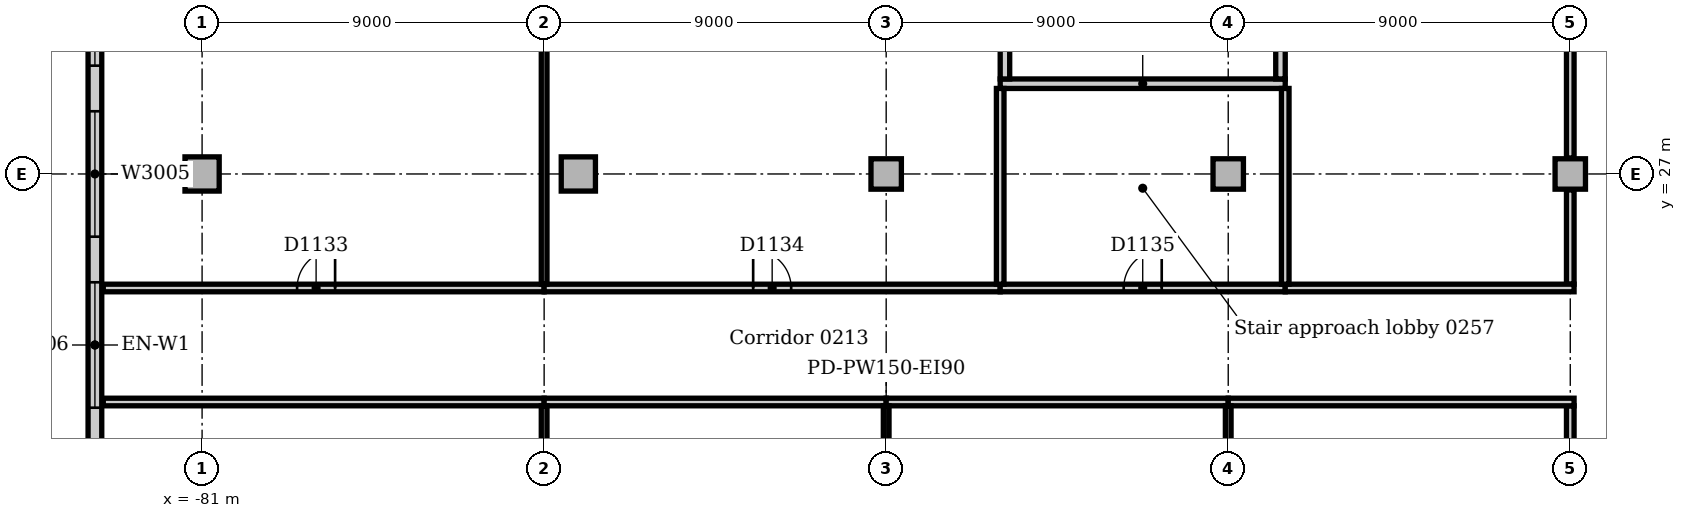
"""IFC4 building model, lengths in metres.
Left out: names, types, materials, properties, quantities, classifications, styles, units other than length and angle.
Written with IfcOpenShell. Run it as: python <this file> out.ifc"""

import sys

from ifc_helpers import new_model, si_unit, direction, frame, frame_2d, origin, origin_2d, place, context, subcontext, project, spatial, rectangle, extrude, element, fill, save


model = new_model("IFC4")
c1 = context("Model", 3, precision=1e-05, world=origin(), true_north=direction((0.0, 1.0)))
c2 = subcontext(c1, "Body", "Model", "MODEL_VIEW")
j1 = project(units=[si_unit("LENGTHUNIT", "METRE"), si_unit("PLANEANGLEUNIT", "RADIAN")], contexts=[c1])
p1 = place(None, origin())
s1 = spatial("IfcSite", under=j1, at=p1, CompositionType="ELEMENT")
p2 = place(p1, origin())
s2 = spatial("IfcBuilding", under=s1, at=p2, CompositionType="ELEMENT")
p3 = place(p2, frame((0.0, 0.0, 11.0)))
s3 = spatial("IfcBuildingStorey", under=s2, at=p3, CompositionType="ELEMENT", Elevation=11.0)
p4 = place(p3, frame((-60.0, 29.375, 0.0), z_axis=(0.0, 0.0, 1.0), x_axis=(1.0, 0.0, 0.0)))
e1 = element("IfcWall", 1, at=p4, inside=s3, PredefinedType="SOLIDWALL", context=c2, shape_type="SweptSolid", body=[
    extrude(rectangle(XDim=7.5, YDim=0.25, at=frame_2d((3.75, 0.0))), origin(), (0.0, 0.0, 1.0), 5.0),
])
for number, where, z_axis, x_axis in (
    (2, (-52.625, 29.5, 0.0), (0.0, 0.0, 1.0), (0.0, 1.0, 0.0)),
    (3, (-59.875, 33.5, 0.0), (0.0, 0.0, 1.0), (0.0, -1.0, 0.0)),
):
    element("IfcWall", number, at=place(p3, frame(where, z_axis=z_axis, x_axis=x_axis)), inside=s3, PredefinedType="SOLIDWALL", context=c2, shape_type="SweptSolid", body=[
        extrude(rectangle(XDim=4.0, YDim=0.25, at=frame_2d((2.0, 0.0))), origin(), (0.0, 0.0, 1.0), 5.0),
    ])
p5 = place(p3, frame((-71.1, 27.0, 0.0), z_axis=(0.0, 0.0, 1.0), x_axis=(1.0, 0.0, 0.0)))
e4 = element("IfcColumn", 4, at=p5, inside=s3, PredefinedType="COLUMN", context=c2, shape_type="SweptSolid", body=[
    extrude(rectangle(XDim=0.9, YDim=0.9, at=origin_2d()), origin(), (0.0, 0.0, 1.0), 4.7),
])
for number, where, z_axis, x_axis in (
    (5, (-63.0, 27.0, 0.0), (0.0, 0.0, 1.0), (1.0, 0.0, 0.0)),
    (6, (-54.0, 27.0, 0.0), (0.0, 0.0, 1.0), (1.0, 0.0, 0.0)),
    (7, (-45.0, 27.0, 0.0), (0.0, 0.0, 1.0), (1.0, 0.0, 0.0)),
):
    element("IfcColumn", number, at=place(p3, frame(where, z_axis=z_axis, x_axis=x_axis)), inside=s3, PredefinedType="COLUMN", context=c2, shape_type="SweptSolid", body=[
        extrude(rectangle(XDim=0.8, YDim=0.8, at=origin_2d()), origin(), (0.0, 0.0, 1.0), 4.7),
    ])
p6 = place(p3, frame((-81.0, 27.0, 0.0), z_axis=(0.0, 0.0, 1.0), x_axis=(1.0, 0.0, 0.0)))
e8 = element("IfcColumn", 8, at=p6, inside=s3, PredefinedType="COLUMN", context=c2, shape_type="SweptSolid", body=[
    extrude(rectangle(XDim=0.9, YDim=0.9, at=origin_2d()), origin(), (0.0, 0.0, 1.0), 4.7),
])
p7 = place(p3, frame((-83.82, 54.0, 0.0), z_axis=(0.0, 0.0, 1.0), x_axis=(0.0, -1.0, 0.0)))
e9 = element("IfcWall", 9, at=p7, inside=s3, PredefinedType="STANDARD", context=c2, shape_type="SweptSolid", body=[
    extrude(rectangle(XDim=63.0, YDim=0.36, at=frame_2d((31.5, 0.0))), origin(), (0.0, 0.0, 1.0), 4.7),
])
p8 = place(p7, frame((2.85, 0.0, 0.9)))
e10 = element("IfcOpeningElement", 10, at=p8, cuts=e9, PredefinedType="OPENING", context=c2, shape_type="SweptSolid", body=[
    extrude(rectangle(XDim=3.3, YDim=2.4, at=frame_2d((1.65, 1.2))), frame((0.0, 0.19, 0.0), z_axis=(0.0, -1.0, 0.0), x_axis=(1.0, 0.0, 0.0)), (0.0, 0.0, 1.0), 0.38),
])
p9 = place(p7, frame((7.35, 0.0, 0.9)))
e11 = element("IfcOpeningElement", 11, at=p9, cuts=e9, PredefinedType="OPENING", context=c2, shape_type="SweptSolid", body=[
    extrude(rectangle(XDim=3.3, YDim=2.4, at=frame_2d((1.65, 1.2))), frame((0.0, 0.19, 0.0), z_axis=(0.0, -1.0, 0.0), x_axis=(1.0, 0.0, 0.0)), (0.0, 0.0, 1.0), 0.38),
])
p10 = place(p7, frame((11.85, 0.0, 0.9)))
e12 = element("IfcOpeningElement", 12, at=p10, cuts=e9, PredefinedType="OPENING", context=c2, shape_type="SweptSolid", body=[
    extrude(rectangle(XDim=3.3, YDim=2.4, at=frame_2d((1.65, 1.2))), frame((0.0, 0.19, 0.0), z_axis=(0.0, -1.0, 0.0), x_axis=(1.0, 0.0, 0.0)), (0.0, 0.0, 1.0), 0.38),
])
p11 = place(p7, frame((16.35, 0.0, 0.9)))
e13 = element("IfcOpeningElement", 13, at=p11, cuts=e9, PredefinedType="OPENING", context=c2, shape_type="SweptSolid", body=[
    extrude(rectangle(XDim=3.3, YDim=2.4, at=frame_2d((1.65, 1.2))), frame((0.0, 0.19, 0.0), z_axis=(0.0, -1.0, 0.0), x_axis=(1.0, 0.0, 0.0)), (0.0, 0.0, 1.0), 0.38),
])
p12 = place(p7, frame((20.85, 0.0, 0.9)))
e14 = element("IfcOpeningElement", 14, at=p12, cuts=e9, PredefinedType="OPENING", context=c2, shape_type="SweptSolid", body=[
    extrude(rectangle(XDim=3.3, YDim=2.4, at=frame_2d((1.65, 1.2))), frame((0.0, 0.19, 0.0), z_axis=(0.0, -1.0, 0.0), x_axis=(1.0, 0.0, 0.0)), (0.0, 0.0, 1.0), 0.38),
])
p13 = place(p7, frame((25.35, 0.0, 0.9)))
e15 = element("IfcOpeningElement", 15, at=p13, cuts=e9, PredefinedType="OPENING", context=c2, shape_type="SweptSolid", body=[
    extrude(rectangle(XDim=3.3, YDim=2.4, at=frame_2d((1.65, 1.2))), frame((0.0, 0.19, 0.0), z_axis=(0.0, -1.0, 0.0), x_axis=(1.0, 0.0, 0.0)), (0.0, 0.0, 1.0), 0.38),
])
p14 = place(p7, frame((29.85, 0.0, 0.9)))
e16 = element("IfcOpeningElement", 16, at=p14, cuts=e9, PredefinedType="OPENING", context=c2, shape_type="SweptSolid", body=[
    extrude(rectangle(XDim=3.3, YDim=2.4, at=frame_2d((1.65, 1.2))), frame((0.0, 0.19, 0.0), z_axis=(0.0, -1.0, 0.0), x_axis=(1.0, 0.0, 0.0)), (0.0, 0.0, 1.0), 0.38),
])
p15 = place(p7, frame((34.35, 0.0, 0.9)))
e17 = element("IfcOpeningElement", 17, at=p15, cuts=e9, PredefinedType="OPENING", context=c2, shape_type="SweptSolid", body=[
    extrude(rectangle(XDim=3.3, YDim=2.4, at=frame_2d((1.65, 1.2))), frame((0.0, 0.19, 0.0), z_axis=(0.0, -1.0, 0.0), x_axis=(1.0, 0.0, 0.0)), (0.0, 0.0, 1.0), 0.38),
])
p16 = place(p7, frame((38.85, 0.0, 0.9)))
e18 = element("IfcOpeningElement", 18, at=p16, cuts=e9, PredefinedType="OPENING", context=c2, shape_type="SweptSolid", body=[
    extrude(rectangle(XDim=3.3, YDim=2.4, at=frame_2d((1.65, 1.2))), frame((0.0, 0.19, 0.0), z_axis=(0.0, -1.0, 0.0), x_axis=(1.0, 0.0, 0.0)), (0.0, 0.0, 1.0), 0.38),
])
p17 = place(p7, frame((43.35, 0.0, 0.9)))
e19 = element("IfcOpeningElement", 19, at=p17, cuts=e9, PredefinedType="OPENING", context=c2, shape_type="SweptSolid", body=[
    extrude(rectangle(XDim=3.3, YDim=2.4, at=frame_2d((1.65, 1.2))), frame((0.0, 0.19, 0.0), z_axis=(0.0, -1.0, 0.0), x_axis=(1.0, 0.0, 0.0)), (0.0, 0.0, 1.0), 0.38),
])
p18 = place(p7, frame((47.85, 0.0, 0.9)))
e20 = element("IfcOpeningElement", 20, at=p18, cuts=e9, PredefinedType="OPENING", context=c2, shape_type="SweptSolid", body=[
    extrude(rectangle(XDim=3.3, YDim=2.4, at=frame_2d((1.65, 1.2))), frame((0.0, 0.19, 0.0), z_axis=(0.0, -1.0, 0.0), x_axis=(1.0, 0.0, 0.0)), (0.0, 0.0, 1.0), 0.38),
])
p19 = place(p7, frame((52.35, 0.0, 0.9)))
e21 = element("IfcOpeningElement", 21, at=p19, cuts=e9, PredefinedType="OPENING", context=c2, shape_type="SweptSolid", body=[
    extrude(rectangle(XDim=3.3, YDim=2.4, at=frame_2d((1.65, 1.2))), frame((0.0, 0.19, 0.0), z_axis=(0.0, -1.0, 0.0), x_axis=(1.0, 0.0, 0.0)), (0.0, 0.0, 1.0), 0.38),
])
p20 = place(p7, frame((56.85, 0.0, 0.9)))
e22 = element("IfcOpeningElement", 22, at=p20, cuts=e9, PredefinedType="OPENING", context=c2, shape_type="SweptSolid", body=[
    extrude(rectangle(XDim=3.3, YDim=2.4, at=frame_2d((1.65, 1.2))), frame((0.0, 0.19, 0.0), z_axis=(0.0, -1.0, 0.0), x_axis=(1.0, 0.0, 0.0)), (0.0, 0.0, 1.0), 0.38),
])
for number, where, z_axis, x_axis in (
    (23, (-45.0, 18.42, 0.0), (0.0, 0.0, 1.0), (0.0, 1.0, 0.0)),
    (24, (-45.0, 24.1, 0.0), (0.0, 0.0, 1.0), (0.0, 1.0, 0.0)),
):
    element("IfcWall", number, at=place(p3, frame(where, z_axis=z_axis, x_axis=x_axis)), inside=s3, PredefinedType="PARTITIONING", context=c2, shape_type="SweptSolid", body=[
        extrude(rectangle(XDim=2.48, YDim=0.2, at=frame_2d((1.24, 0.0))), origin(), (0.0, 0.0, 1.0), 4.7),
    ])
p21 = place(p3, frame((-45.0, 27.42, 0.0), z_axis=(0.0, 0.0, 1.0), x_axis=(0.0, 1.0, 0.0)))
e25 = element("IfcWall", 25, at=p21, inside=s3, PredefinedType="PARTITIONING", context=c2, shape_type="SweptSolid", body=[
    extrude(rectangle(XDim=8.16, YDim=0.2, at=frame_2d((4.08, 0.0))), origin(), (0.0, 0.0, 1.0), 4.7),
])
p22 = place(p21, frame((4.905, 0.0, 0.0)))
e26 = element("IfcOpeningElement", 26, at=p22, cuts=e25, PredefinedType="OPENING", context=c2, shape_type="SweptSolid", body=[
    extrude(rectangle(XDim=1.0, YDim=2.1, at=frame_2d((0.5, 1.05))), frame((0.0, 0.11, 0.0), z_axis=(0.0, -1.0, 0.0), x_axis=(1.0, 0.0, 0.0)), (0.0, 0.0, 1.0), 0.22),
])
p23 = place(p3, frame((-83.6, 21.0, 0.0), z_axis=(0.0, 0.0, 1.0), x_axis=(1.0, 0.0, 0.0)))
e27 = element("IfcWall", 27, at=p23, inside=s3, PredefinedType="PARTITIONING", context=c2, shape_type="SweptSolid", body=[
    extrude(rectangle(XDim=11.6, YDim=0.2, at=frame_2d((5.8, 0.0))), origin(), (0.0, 0.0, 1.0), 4.7),
])
for number, where, z_axis, x_axis in (
    (28, (-72.0, 21.0, 0.0), (0.0, 0.0, 1.0), (1.0, 0.0, 0.0)),
    (29, (-63.0, 21.0, 0.0), (0.0, 0.0, 1.0), (1.0, 0.0, 0.0)),
):
    element("IfcWall", number, at=place(p3, frame(where, z_axis=z_axis, x_axis=x_axis)), inside=s3, PredefinedType="PARTITIONING", context=c2, shape_type="SweptSolid", body=[
        extrude(rectangle(XDim=9.0, YDim=0.2, at=frame_2d((4.5, 0.0))), origin(), (0.0, 0.0, 1.0), 4.7),
    ])
p24 = place(p3, frame((-54.0, 21.0, 0.0), z_axis=(0.0, 0.0, 1.0), x_axis=(1.0, 0.0, 0.0)))
e30 = element("IfcWall", 30, at=p24, inside=s3, PredefinedType="PARTITIONING", context=c2, shape_type="SweptSolid", body=[
    extrude(rectangle(XDim=9.1, YDim=0.2, at=frame_2d((4.55, 0.0))), origin(), (0.0, 0.0, 1.0), 4.7),
])
p25 = place(p3, frame((-83.6, 24.0, 0.0), z_axis=(0.0, 0.0, 1.0), x_axis=(1.0, 0.0, 0.0)))
e31 = element("IfcWall", 31, at=p25, inside=s3, PredefinedType="PARTITIONING", context=c2, shape_type="SweptSolid", body=[
    extrude(rectangle(XDim=11.6, YDim=0.2, at=frame_2d((5.8, 0.0))), origin(), (0.0, 0.0, 1.0), 4.7),
])
p26 = place(p25, frame((5.1, 0.0, 0.0)))
e32 = element("IfcOpeningElement", 32, at=p26, cuts=e31, PredefinedType="OPENING", context=c2, shape_type="SweptSolid", body=[
    extrude(rectangle(XDim=1.0, YDim=2.1, at=frame_2d((0.5, 1.05))), frame((0.0, 0.11, 0.0), z_axis=(0.0, -1.0, 0.0), x_axis=(1.0, 0.0, 0.0)), (0.0, 0.0, 1.0), 0.22),
])
p27 = place(p3, frame((-72.0, 24.0, 0.0), z_axis=(0.0, 0.0, 1.0), x_axis=(1.0, 0.0, 0.0)))
e33 = element("IfcWall", 33, at=p27, inside=s3, PredefinedType="PARTITIONING", context=c2, shape_type="SweptSolid", body=[
    extrude(rectangle(XDim=12.0, YDim=0.2, at=frame_2d((6.0, 0.0))), origin(), (0.0, 0.0, 1.0), 4.7),
])
p28 = place(p27, frame((5.5, 0.0, 0.0)))
e34 = element("IfcOpeningElement", 34, at=p28, cuts=e33, PredefinedType="OPENING", context=c2, shape_type="SweptSolid", body=[
    extrude(rectangle(XDim=1.0, YDim=2.1, at=frame_2d((0.5, 1.05))), frame((0.0, 0.11, 0.0), z_axis=(0.0, -1.0, 0.0), x_axis=(1.0, 0.0, 0.0)), (0.0, 0.0, 1.0), 0.22),
])
p29 = place(p3, frame((-60.0, 24.0, 0.0), z_axis=(0.0, 0.0, 1.0), x_axis=(1.0, 0.0, 0.0)))
e35 = element("IfcWall", 35, at=p29, inside=s3, PredefinedType="PARTITIONING", context=c2, shape_type="SweptSolid", body=[
    extrude(rectangle(XDim=7.5, YDim=0.2, at=frame_2d((3.75, 0.0))), origin(), (0.0, 0.0, 1.0), 4.7),
])
p30 = place(p29, frame((3.25, 0.0, 0.0)))
e36 = element("IfcOpeningElement", 36, at=p30, cuts=e35, PredefinedType="OPENING", context=c2, shape_type="SweptSolid", body=[
    extrude(rectangle(XDim=1.0, YDim=2.1, at=frame_2d((0.5, 1.05))), frame((0.0, 0.11, 0.0), z_axis=(0.0, -1.0, 0.0), x_axis=(1.0, 0.0, 0.0)), (0.0, 0.0, 1.0), 0.22),
])
p31 = place(p3, frame((-52.5, 24.0, 0.0), z_axis=(0.0, 0.0, 1.0), x_axis=(1.0, 0.0, 0.0)))
e37 = element("IfcWall", 37, at=p31, inside=s3, PredefinedType="PARTITIONING", context=c2, shape_type="SweptSolid", body=[
    extrude(rectangle(XDim=7.6, YDim=0.2, at=frame_2d((3.8, 0.0))), origin(), (0.0, 0.0, 1.0), 4.7),
])
p32 = place(p3, frame((-72.0, 3.7, 0.0), z_axis=(0.0, 0.0, 1.0), x_axis=(0.0, 1.0, 0.0)))
e38 = element("IfcWall", 38, at=p32, inside=s3, PredefinedType="PARTITIONING", context=c2, shape_type="SweptSolid", body=[
    extrude(rectangle(XDim=17.2, YDim=0.15, at=frame_2d((8.6, 0.0))), origin(), (0.0, 0.0, 1.0), 4.7),
])
for number, where, z_axis, x_axis in (
    (39, (-63.0, 18.42, 0.0), (0.0, 0.0, 1.0), (0.0, 1.0, 0.0)),
    (40, (-54.0, 18.42, 0.0), (0.0, 0.0, 1.0), (0.0, 1.0, 0.0)),
):
    element("IfcWall", number, at=place(p3, frame(where, z_axis=z_axis, x_axis=x_axis)), inside=s3, PredefinedType="PARTITIONING", context=c2, shape_type="SweptSolid", body=[
        extrude(rectangle(XDim=2.48, YDim=0.15, at=frame_2d((1.24, 0.0))), origin(), (0.0, 0.0, 1.0), 4.7),
    ])
p33 = place(p3, frame((-72.0, 24.1, 0.0), z_axis=(0.0, 0.0, 1.0), x_axis=(0.0, 1.0, 0.0)))
e41 = element("IfcWall", 41, at=p33, inside=s3, PredefinedType="PARTITIONING", context=c2, shape_type="SweptSolid", body=[
    extrude(rectangle(XDim=17.45, YDim=0.15, at=frame_2d((8.725, 0.0))), origin(), (0.0, 0.0, 1.0), 4.7),
])
for number, where, z_axis, x_axis in (
    (42, (-60.0, 24.1, 0.0), (0.0, 0.0, 1.0), (0.0, 1.0, 0.0)),
    (43, (-52.5, 24.1, 0.0), (0.0, 0.0, 1.0), (0.0, 1.0, 0.0)),
):
    element("IfcWall", number, at=place(p3, frame(where, z_axis=z_axis, x_axis=x_axis)), inside=s3, PredefinedType="PARTITIONING", context=c2, shape_type="SweptSolid", body=[
        extrude(rectangle(XDim=5.15, YDim=0.2, at=frame_2d((2.575, 0.0))), origin(), (0.0, 0.0, 1.0), 4.7),
    ])
p34 = place(p12, origin())
e44 = element("IfcWindow", 44, at=p34, inside=s3, PartitioningType="SINGLE_PANEL", PredefinedType="WINDOW", context=c2, shape_type="SweptSolid", body=[
    extrude(rectangle(XDim=3.3, YDim=2.4, at=frame_2d((1.65, 1.2))), frame((0.0, 0.13, 0.0), z_axis=(0.0, -1.0, 0.0), x_axis=(1.0, 0.0, 0.0)), (0.0, 0.0, 1.0), 0.06),
])
fill(e14, e44)
p35 = place(p13, origin())
e45 = element("IfcWindow", 45, at=p35, inside=s3, PartitioningType="SINGLE_PANEL", PredefinedType="WINDOW", context=c2, shape_type="SweptSolid", body=[
    extrude(rectangle(XDim=3.3, YDim=2.4, at=frame_2d((1.65, 1.2))), frame((0.0, 0.13, 0.0), z_axis=(0.0, -1.0, 0.0), x_axis=(1.0, 0.0, 0.0)), (0.0, 0.0, 1.0), 0.06),
])
fill(e15, e45)
p36 = place(p14, origin())
e46 = element("IfcWindow", 46, at=p36, inside=s3, PartitioningType="SINGLE_PANEL", PredefinedType="WINDOW", context=c2, shape_type="SweptSolid", body=[
    extrude(rectangle(XDim=3.3, YDim=2.4, at=frame_2d((1.65, 1.2))), frame((0.0, 0.13, 0.0), z_axis=(0.0, -1.0, 0.0), x_axis=(1.0, 0.0, 0.0)), (0.0, 0.0, 1.0), 0.06),
])
fill(e16, e46)
p37 = place(p26, origin())
e47 = element("IfcDoor", 47, at=p37, inside=s3, OperationType="SINGLE_SWING_RIGHT", PredefinedType="DOOR", context=c2, shape_type="SweptSolid", body=[
    extrude(rectangle(XDim=1.0, YDim=2.1, at=frame_2d((0.5, 1.05))), frame((0.0, 0.025, 0.0), z_axis=(0.0, -1.0, 0.0), x_axis=(1.0, 0.0, 0.0)), (0.0, 0.0, 1.0), 0.05),
])
fill(e32, e47)
p38 = place(p28, origin())
e48 = element("IfcDoor", 48, at=p38, inside=s3, OperationType="SINGLE_SWING_LEFT", PredefinedType="DOOR", context=c2, shape_type="SweptSolid", body=[
    extrude(rectangle(XDim=1.0, YDim=2.1, at=frame_2d((0.5, 1.05))), frame((0.0, 0.025, 0.0), z_axis=(0.0, -1.0, 0.0), x_axis=(1.0, 0.0, 0.0)), (0.0, 0.0, 1.0), 0.05),
])
fill(e34, e48)
p39 = place(p30, origin())
e49 = element("IfcDoor", 49, at=p39, inside=s3, OperationType="SINGLE_SWING_RIGHT", PredefinedType="DOOR", context=c2, shape_type="SweptSolid", body=[
    extrude(rectangle(XDim=1.0, YDim=2.1, at=frame_2d((0.5, 1.05))), frame((0.0, 0.025, 0.0), z_axis=(0.0, -1.0, 0.0), x_axis=(1.0, 0.0, 0.0)), (0.0, 0.0, 1.0), 0.05),
])
fill(e36, e49)
save(model, sys.argv[1])
